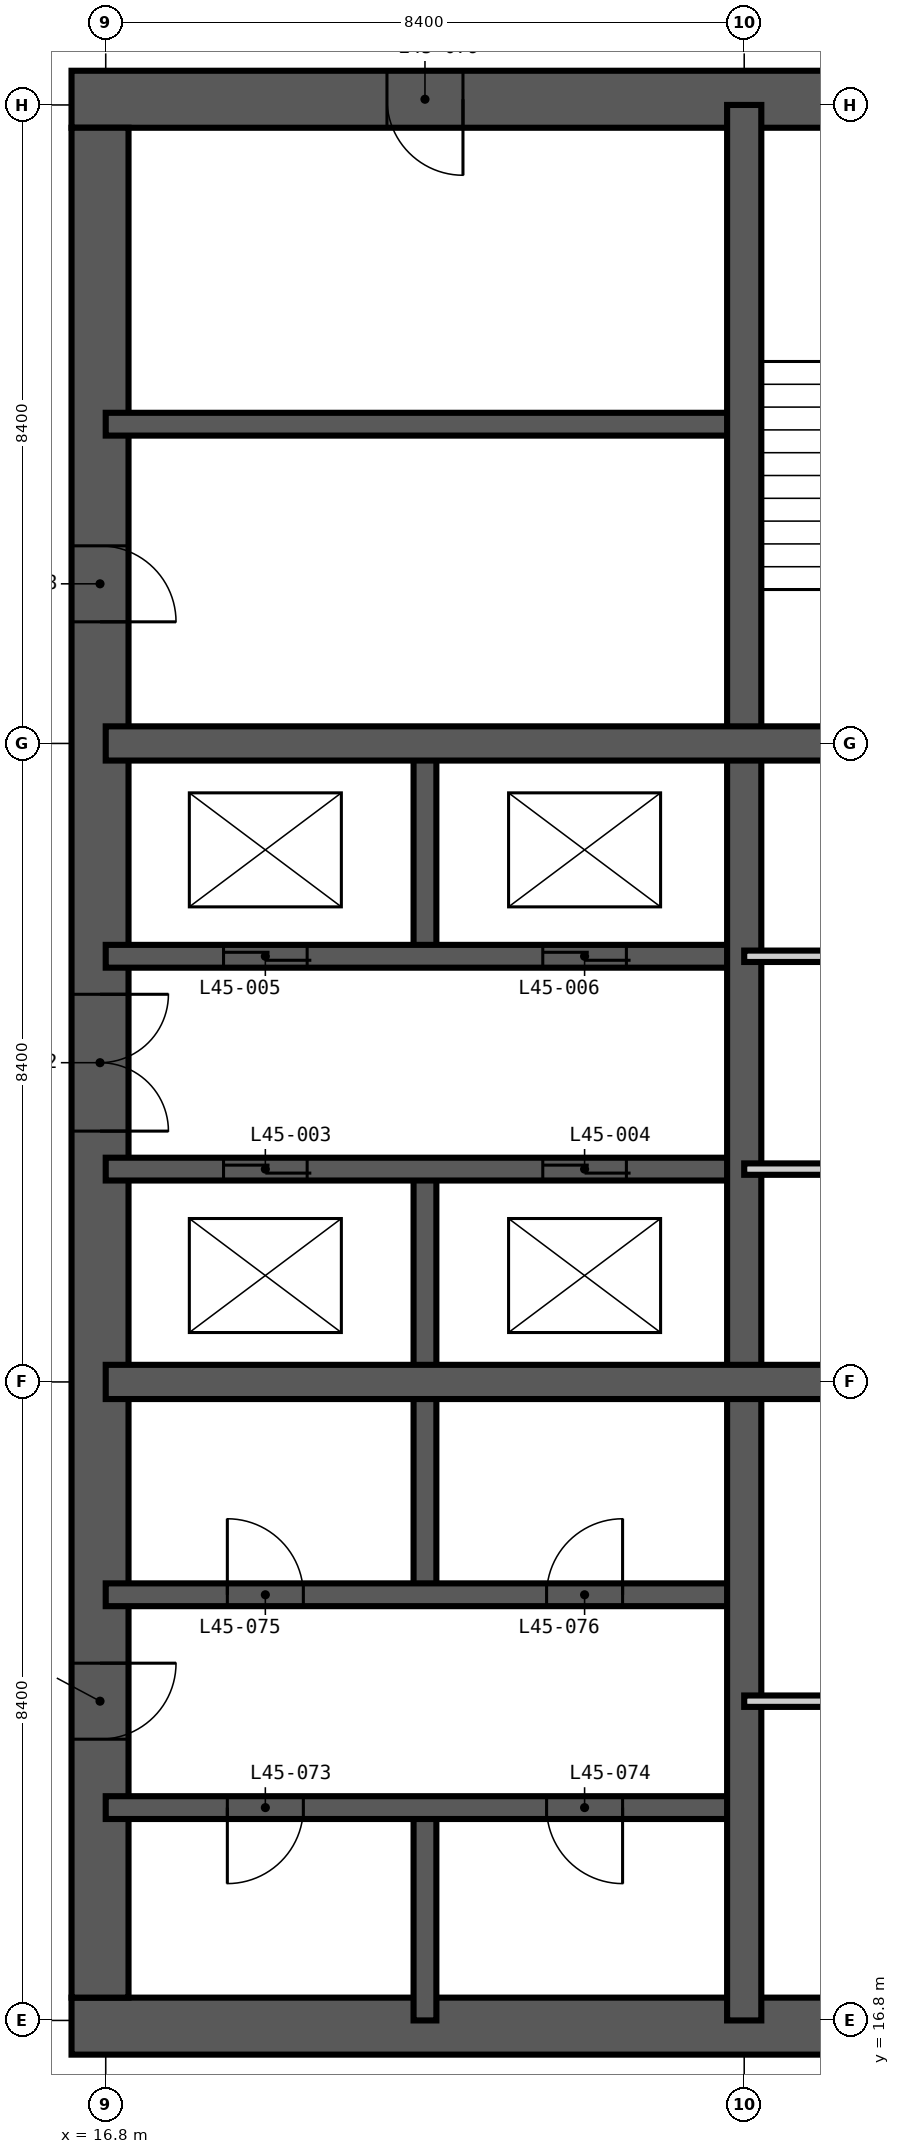
"""IFC4 building model, lengths in metres.
Left out: names, types, materials, properties, quantities, classifications, styles, units other than length and angle.
Written with IfcOpenShell. Run it as: python <this file> out.ifc"""

import sys

from ifc_helpers import new_model, si_unit, direction, frame, frame_2d, origin, place, context, subcontext, project, spatial, rectangle, extrude, element, fill, save


model = new_model("IFC4")
c1 = context("Model", 3, precision=1e-05, world=origin(), true_north=direction((0.0, 1.0)))
c2 = subcontext(c1, "Body", "Model", "MODEL_VIEW")
j1 = project(units=[si_unit("LENGTHUNIT", "METRE"), si_unit("PLANEANGLEUNIT", "RADIAN")], contexts=[c1])
p1 = place(None, origin())
s1 = spatial("IfcSite", under=j1, at=p1, CompositionType="ELEMENT")
p2 = place(p1, origin())
s2 = spatial("IfcBuilding", under=s1, at=p2, CompositionType="ELEMENT")
p3 = place(p2, frame((0.0, 0.0, 177.0)))
s3 = spatial("IfcBuildingStorey", under=s2, at=p3, CompositionType="ELEMENT", Elevation=177.0)
p4 = place(p3, frame((16.35, 16.725, -0.35), z_axis=(0.0, 0.0, 1.0), x_axis=(1.0, 0.0, 0.0)))
e1 = element("IfcWall", 1, at=p4, inside=s3, PredefinedType="SHEAR", context=c2, shape_type="SweptSolid", body=[
    extrude(rectangle(XDim=26.1, YDim=0.75, at=frame_2d((13.05, 0.0))), origin(), (0.0, 0.0, 1.0), 3.6),
])
p5 = place(p4, frame((12.55, 0.0, 0.35)))
e2 = element("IfcOpeningElement", 2, at=p5, cuts=e1, PredefinedType="OPENING", context=c2, shape_type="SweptSolid", body=[
    extrude(rectangle(XDim=1.0, YDim=2.1, at=frame_2d((0.5, 1.05))), frame((0.0, 0.385, 0.0), z_axis=(0.0, -1.0, 0.0), x_axis=(1.0, 0.0, 0.0)), (0.0, 0.0, 1.0), 0.77),
])
p6 = place(p4, frame((18.85, 0.0, 0.35)))
e3 = element("IfcOpeningElement", 3, at=p6, cuts=e1, PredefinedType="OPENING", context=c2, shape_type="SweptSolid", body=[
    extrude(rectangle(XDim=1.0, YDim=2.1, at=frame_2d((0.5, 1.05))), frame((0.0, 0.385, 0.0), z_axis=(0.0, -1.0, 0.0), x_axis=(1.0, 0.0, 0.0)), (0.0, 0.0, 1.0), 0.77),
])
p7 = place(p3, frame((42.45, 42.075, -0.35), z_axis=(0.0, 0.0, 1.0), x_axis=(-1.0, 0.0, 0.0)))
e4 = element("IfcWall", 4, at=p7, inside=s3, PredefinedType="SHEAR", context=c2, shape_type="SweptSolid", body=[
    extrude(rectangle(XDim=26.1, YDim=0.75, at=frame_2d((13.05, 0.0))), origin(), (0.0, 0.0, 1.0), 3.6),
])
p8 = place(p7, frame((20.95, 0.0, 0.35)))
e5 = element("IfcOpeningElement", 5, at=p8, cuts=e4, PredefinedType="OPENING", context=c2, shape_type="SweptSolid", body=[
    extrude(rectangle(XDim=1.0, YDim=2.1, at=frame_2d((0.5, 1.05))), frame((0.0, 0.385, 0.0), z_axis=(0.0, -1.0, 0.0), x_axis=(1.0, 0.0, 0.0)), (0.0, 0.0, 1.0), 0.77),
])
p9 = place(p7, frame((10.35, 0.0, 0.35)))
e6 = element("IfcOpeningElement", 6, at=p9, cuts=e4, PredefinedType="OPENING", context=c2, shape_type="SweptSolid", body=[
    extrude(rectangle(XDim=1.2, YDim=2.2, at=frame_2d((0.6, 1.1))), frame((0.0, 0.385, 0.0), z_axis=(0.0, -1.0, 0.0), x_axis=(1.0, 0.0, 0.0)), (0.0, 0.0, 1.0), 0.77),
])
p10 = place(p3, frame((16.725, 41.7, -0.35), z_axis=(0.0, 0.0, 1.0), x_axis=(0.0, -1.0, 0.0)))
e7 = element("IfcWall", 7, at=p10, inside=s3, PredefinedType="SHEAR", context=c2, shape_type="SweptSolid", body=[
    extrude(rectangle(XDim=24.6, YDim=0.75, at=frame_2d((12.3, 0.0))), origin(), (0.0, 0.0, 1.0), 3.6),
])
p11 = place(p10, frame((11.4, 0.0, 0.35)))
e8 = element("IfcOpeningElement", 8, at=p11, cuts=e7, PredefinedType="OPENING", context=c2, shape_type="SweptSolid", body=[
    extrude(rectangle(XDim=1.8, YDim=2.2, at=frame_2d((0.9, 1.1))), frame((0.0, 0.385, 0.0), z_axis=(0.0, -1.0, 0.0), x_axis=(1.0, 0.0, 0.0)), (0.0, 0.0, 1.0), 0.77),
])
p12 = place(p10, frame((20.2, 0.0, 0.35)))
e9 = element("IfcOpeningElement", 9, at=p12, cuts=e7, PredefinedType="OPENING", context=c2, shape_type="SweptSolid", body=[
    extrude(rectangle(XDim=1.0, YDim=2.1, at=frame_2d((0.5, 1.05))), frame((0.0, 0.385, 0.0), z_axis=(0.0, -1.0, 0.0), x_axis=(1.0, 0.0, 0.0)), (0.0, 0.0, 1.0), 0.77),
])
p13 = place(p10, frame((5.5, 0.0, 0.35)))
e10 = element("IfcOpeningElement", 10, at=p13, cuts=e7, PredefinedType="OPENING", context=c2, shape_type="SweptSolid", body=[
    extrude(rectangle(XDim=1.0, YDim=2.1, at=frame_2d((0.5, 1.05))), frame((0.0, 0.385, 0.0), z_axis=(0.0, -1.0, 0.0), x_axis=(1.0, 0.0, 0.0)), (0.0, 0.0, 1.0), 0.77),
])
p14 = place(p3, frame((21.0, 16.8, -0.35), z_axis=(0.0, 0.0, 1.0), x_axis=(0.0, 1.0, 0.0)))
e11 = element("IfcWall", 11, at=p14, inside=s3, PredefinedType="SHEAR", context=c2, shape_type="SweptSolid", body=[
    extrude(rectangle(XDim=2.8, YDim=0.3, at=frame_2d((1.4, 0.0))), origin(), (0.0, 0.0, 1.0), 3.6),
])
p15 = place(p3, frame((21.0, 22.4, -0.35), z_axis=(0.0, 0.0, 1.0), x_axis=(0.0, 1.0, 0.0)))
e12 = element("IfcWall", 12, at=p15, inside=s3, PredefinedType="SHEAR", context=c2, shape_type="SweptSolid", body=[
    extrude(rectangle(XDim=5.6, YDim=0.3, at=frame_2d((2.8, 0.0))), origin(), (0.0, 0.0, 1.0), 3.6),
])
p16 = place(p3, frame((21.0, 30.8, -0.35), z_axis=(0.0, 0.0, 1.0), x_axis=(0.0, 1.0, 0.0)))
e13 = element("IfcWall", 13, at=p16, inside=s3, PredefinedType="SHEAR", context=c2, shape_type="SweptSolid", body=[
    extrude(rectangle(XDim=2.8, YDim=0.3, at=frame_2d((1.4, 0.0))), origin(), (0.0, 0.0, 1.0), 3.6),
])
p17 = place(p3, frame((16.8, 19.6, -0.35), z_axis=(0.0, 0.0, 1.0), x_axis=(1.0, 0.0, 0.0)))
e14 = element("IfcWall", 14, at=p17, inside=s3, PredefinedType="SHEAR", context=c2, shape_type="SweptSolid", body=[
    extrude(rectangle(XDim=8.4, YDim=0.3, at=frame_2d((4.2, 0.0))), origin(), (0.0, 0.0, 1.0), 3.6),
])
p18 = place(p17, frame((1.6, 0.0, 0.35)))
e15 = element("IfcOpeningElement", 15, at=p18, cuts=e14, PredefinedType="OPENING", context=c2, shape_type="SweptSolid", body=[
    extrude(rectangle(XDim=1.0, YDim=2.1, at=frame_2d((0.5, 1.05))), frame((0.0, 0.16, 0.0), z_axis=(0.0, -1.0, 0.0), x_axis=(1.0, 0.0, 0.0)), (0.0, 0.0, 1.0), 0.32),
])
p19 = place(p17, frame((5.8, 0.0, 0.35)))
e16 = element("IfcOpeningElement", 16, at=p19, cuts=e14, PredefinedType="OPENING", context=c2, shape_type="SweptSolid", body=[
    extrude(rectangle(XDim=1.0, YDim=2.1, at=frame_2d((0.5, 1.05))), frame((0.0, 0.16, 0.0), z_axis=(0.0, -1.0, 0.0), x_axis=(1.0, 0.0, 0.0)), (0.0, 0.0, 1.0), 0.32),
])
p20 = place(p3, frame((16.8, 22.4, -0.35), z_axis=(0.0, 0.0, 1.0), x_axis=(1.0, 0.0, 0.0)))
e17 = element("IfcWall", 17, at=p20, inside=s3, PredefinedType="SHEAR", context=c2, shape_type="SweptSolid", body=[
    extrude(rectangle(XDim=8.4, YDim=0.3, at=frame_2d((4.2, 0.0))), origin(), (0.0, 0.0, 1.0), 3.6),
])
p21 = place(p20, frame((1.6, 0.0, 0.35)))
e18 = element("IfcOpeningElement", 18, at=p21, cuts=e17, PredefinedType="OPENING", context=c2, shape_type="SweptSolid", body=[
    extrude(rectangle(XDim=1.0, YDim=2.1, at=frame_2d((0.5, 1.05))), frame((0.0, 0.16, 0.0), z_axis=(0.0, -1.0, 0.0), x_axis=(1.0, 0.0, 0.0)), (0.0, 0.0, 1.0), 0.32),
])
p22 = place(p20, frame((5.8, 0.0, 0.35)))
e19 = element("IfcOpeningElement", 19, at=p22, cuts=e17, PredefinedType="OPENING", context=c2, shape_type="SweptSolid", body=[
    extrude(rectangle(XDim=1.0, YDim=2.1, at=frame_2d((0.5, 1.05))), frame((0.0, 0.16, 0.0), z_axis=(0.0, -1.0, 0.0), x_axis=(1.0, 0.0, 0.0)), (0.0, 0.0, 1.0), 0.32),
])
p23 = place(p3, frame((16.8, 28.0, -0.35), z_axis=(0.0, 0.0, 1.0), x_axis=(1.0, 0.0, 0.0)))
e20 = element("IfcWall", 20, at=p23, inside=s3, PredefinedType="SHEAR", context=c2, shape_type="SweptSolid", body=[
    extrude(rectangle(XDim=8.4, YDim=0.3, at=frame_2d((4.2, 0.0))), origin(), (0.0, 0.0, 1.0), 3.6),
])
p24 = place(p23, frame((1.55, 0.0, 0.35)))
e21 = element("IfcOpeningElement", 21, at=p24, cuts=e20, PredefinedType="OPENING", context=c2, shape_type="SweptSolid", body=[
    extrude(rectangle(XDim=1.1, YDim=2.2, at=frame_2d((0.55, 1.1))), frame((0.0, 0.16, 0.0), z_axis=(0.0, -1.0, 0.0), x_axis=(1.0, 0.0, 0.0)), (0.0, 0.0, 1.0), 0.32),
])
p25 = place(p23, frame((5.75, 0.0, 0.35)))
e22 = element("IfcOpeningElement", 22, at=p25, cuts=e20, PredefinedType="OPENING", context=c2, shape_type="SweptSolid", body=[
    extrude(rectangle(XDim=1.1, YDim=2.2, at=frame_2d((0.55, 1.1))), frame((0.0, 0.16, 0.0), z_axis=(0.0, -1.0, 0.0), x_axis=(1.0, 0.0, 0.0)), (0.0, 0.0, 1.0), 0.32),
])
p26 = place(p3, frame((16.8, 30.8, -0.35), z_axis=(0.0, 0.0, 1.0), x_axis=(1.0, 0.0, 0.0)))
e23 = element("IfcWall", 23, at=p26, inside=s3, PredefinedType="SHEAR", context=c2, shape_type="SweptSolid", body=[
    extrude(rectangle(XDim=8.4, YDim=0.3, at=frame_2d((4.2, 0.0))), origin(), (0.0, 0.0, 1.0), 3.6),
])
p27 = place(p26, frame((1.55, 0.0, 0.35)))
e24 = element("IfcOpeningElement", 24, at=p27, cuts=e23, PredefinedType="OPENING", context=c2, shape_type="SweptSolid", body=[
    extrude(rectangle(XDim=1.1, YDim=2.2, at=frame_2d((0.55, 1.1))), frame((0.0, 0.16, 0.0), z_axis=(0.0, -1.0, 0.0), x_axis=(1.0, 0.0, 0.0)), (0.0, 0.0, 1.0), 0.32),
])
p28 = place(p26, frame((5.75, 0.0, 0.35)))
e25 = element("IfcOpeningElement", 25, at=p28, cuts=e23, PredefinedType="OPENING", context=c2, shape_type="SweptSolid", body=[
    extrude(rectangle(XDim=1.1, YDim=2.2, at=frame_2d((0.55, 1.1))), frame((0.0, 0.16, 0.0), z_axis=(0.0, -1.0, 0.0), x_axis=(1.0, 0.0, 0.0)), (0.0, 0.0, 1.0), 0.32),
])
p29 = place(p3, frame((16.8, 37.8, -0.35), z_axis=(0.0, 0.0, 1.0), x_axis=(1.0, 0.0, 0.0)))
e26 = element("IfcWall", 26, at=p29, inside=s3, PredefinedType="SHEAR", context=c2, shape_type="SweptSolid", body=[
    extrude(rectangle(XDim=8.4, YDim=0.3, at=frame_2d((4.2, 0.0))), origin(), (0.0, 0.0, 1.0), 3.6),
])
for number, where, z_axis, x_axis in (
    (27, (25.2, 16.8, -0.35), (0.0, 0.0, 1.0), (0.0, 1.0, 0.0)),
    (28, (16.8, 25.2, -0.35), (0.0, 0.0, 1.0), (1.0, 0.0, 0.0)),
    (29, (16.8, 33.6, -0.35), (0.0, 0.0, 1.0), (1.0, 0.0, 0.0)),
):
    element("IfcWall", number, at=place(p3, frame(where, z_axis=z_axis, x_axis=x_axis)), inside=s3, PredefinedType="SHEAR", context=c2, shape_type="SweptSolid", body=[
        extrude(rectangle(XDim=25.2, YDim=0.45, at=frame_2d((12.6, 0.0))), origin(), (0.0, 0.0, 1.0), 3.6),
    ])
p30 = place(p3, frame((25.2, 21.0, 0.0), z_axis=(0.0, 0.0, 1.0), x_axis=(1.0, 0.0, 0.0)))
e30 = element("IfcWall", 30, at=p30, inside=s3, PredefinedType="PARTITIONING", context=c2, shape_type="SweptSolid", body=[
    extrude(rectangle(XDim=8.4, YDim=0.15, at=frame_2d((4.2, 0.0))), origin(), (0.0, 0.0, 1.0), 3.25),
])
p31 = place(p30, frame((3.7, 0.0, 0.0)))
e31 = element("IfcOpeningElement", 31, at=p31, cuts=e30, PredefinedType="OPENING", context=c2, shape_type="SweptSolid", body=[
    extrude(rectangle(XDim=1.0, YDim=2.1, at=frame_2d((0.5, 1.05))), frame((0.0, 0.085, 0.0), z_axis=(0.0, -1.0, 0.0), x_axis=(1.0, 0.0, 0.0)), (0.0, 0.0, 1.0), 0.17),
])
p32 = place(p3, frame((25.2, 28.0, 0.0), z_axis=(0.0, 0.0, 1.0), x_axis=(1.0, 0.0, 0.0)))
e32 = element("IfcWall", 32, at=p32, inside=s3, PredefinedType="PARTITIONING", context=c2, shape_type="SweptSolid", body=[
    extrude(rectangle(XDim=8.4, YDim=0.15, at=frame_2d((4.2, 0.0))), origin(), (0.0, 0.0, 1.0), 3.25),
])
p33 = place(p32, frame((5.8, 0.0, 0.0)))
e33 = element("IfcOpeningElement", 33, at=p33, cuts=e32, PredefinedType="OPENING", context=c2, shape_type="SweptSolid", body=[
    extrude(rectangle(XDim=1.0, YDim=2.1, at=frame_2d((0.5, 1.05))), frame((0.0, 0.085, 0.0), z_axis=(0.0, -1.0, 0.0), x_axis=(1.0, 0.0, 0.0)), (0.0, 0.0, 1.0), 0.17),
])
p34 = place(p32, frame((1.6, 0.0, 0.0)))
e34 = element("IfcOpeningElement", 34, at=p34, cuts=e32, PredefinedType="OPENING", context=c2, shape_type="SweptSolid", body=[
    extrude(rectangle(XDim=1.0, YDim=2.1, at=frame_2d((0.5, 1.05))), frame((0.0, 0.085, 0.0), z_axis=(0.0, -1.0, 0.0), x_axis=(1.0, 0.0, 0.0)), (0.0, 0.0, 1.0), 0.17),
])
p35 = place(p3, frame((25.2, 30.8, 0.0), z_axis=(0.0, 0.0, 1.0), x_axis=(1.0, 0.0, 0.0)))
e35 = element("IfcWall", 35, at=p35, inside=s3, PredefinedType="PARTITIONING", context=c2, shape_type="SweptSolid", body=[
    extrude(rectangle(XDim=8.4, YDim=0.15, at=frame_2d((4.2, 0.0))), origin(), (0.0, 0.0, 1.0), 3.25),
])
p36 = place(p35, frame((3.7, 0.0, 0.0)))
e36 = element("IfcOpeningElement", 36, at=p36, cuts=e35, PredefinedType="OPENING", context=c2, shape_type="SweptSolid", body=[
    extrude(rectangle(XDim=1.0, YDim=2.1, at=frame_2d((0.5, 1.05))), frame((0.0, 0.085, 0.0), z_axis=(0.0, -1.0, 0.0), x_axis=(1.0, 0.0, 0.0)), (0.0, 0.0, 1.0), 0.17),
])
p37 = place(p24, origin())
e37 = element("IfcDoor", 37, at=p37, inside=s3, OperationType="DOUBLE_DOOR_SLIDING", PredefinedType="DOOR", context=c2, shape_type="SweptSolid", body=[
    extrude(rectangle(XDim=1.1, YDim=2.2, at=frame_2d((0.55, 1.1))), frame((0.0, 0.025, 0.0), z_axis=(0.0, -1.0, 0.0), x_axis=(1.0, 0.0, 0.0)), (0.0, 0.0, 1.0), 0.05),
])
fill(e21, e37)
p38 = place(p25, origin())
e38 = element("IfcDoor", 38, at=p38, inside=s3, OperationType="DOUBLE_DOOR_SLIDING", PredefinedType="DOOR", context=c2, shape_type="SweptSolid", body=[
    extrude(rectangle(XDim=1.1, YDim=2.2, at=frame_2d((0.55, 1.1))), frame((0.0, 0.025, 0.0), z_axis=(0.0, -1.0, 0.0), x_axis=(1.0, 0.0, 0.0)), (0.0, 0.0, 1.0), 0.05),
])
fill(e22, e38)
p39 = place(p27, origin())
e39 = element("IfcDoor", 39, at=p39, inside=s3, OperationType="DOUBLE_DOOR_SLIDING", PredefinedType="DOOR", context=c2, shape_type="SweptSolid", body=[
    extrude(rectangle(XDim=1.1, YDim=2.2, at=frame_2d((0.55, 1.1))), frame((0.0, 0.025, 0.0), z_axis=(0.0, -1.0, 0.0), x_axis=(1.0, 0.0, 0.0)), (0.0, 0.0, 1.0), 0.05),
])
fill(e24, e39)
p40 = place(p28, origin())
e40 = element("IfcDoor", 40, at=p40, inside=s3, OperationType="DOUBLE_DOOR_SLIDING", PredefinedType="DOOR", context=c2, shape_type="SweptSolid", body=[
    extrude(rectangle(XDim=1.1, YDim=2.2, at=frame_2d((0.55, 1.1))), frame((0.0, 0.025, 0.0), z_axis=(0.0, -1.0, 0.0), x_axis=(1.0, 0.0, 0.0)), (0.0, 0.0, 1.0), 0.05),
])
fill(e25, e40)
p41 = place(p11, origin())
e41 = element("IfcDoor", 41, at=p41, inside=s3, OperationType="DOUBLE_DOOR_DOUBLE_SWING", PredefinedType="DOOR", context=c2, shape_type="SweptSolid", body=[
    extrude(rectangle(XDim=1.8, YDim=2.2, at=frame_2d((0.9, 1.1))), frame((0.0, 0.025, 0.0), z_axis=(0.0, -1.0, 0.0), x_axis=(1.0, 0.0, 0.0)), (0.0, 0.0, 1.0), 0.05),
])
fill(e8, e41)
p42 = place(p18, frame((1.0, 0.0, 0.0), z_axis=(0.0, 0.0, 1.0), x_axis=(-1.0, 0.0, 0.0)))
e42 = element("IfcDoor", 42, at=p42, inside=s3, OperationType="SINGLE_SWING_RIGHT", PredefinedType="DOOR", context=c2, shape_type="SweptSolid", body=[
    extrude(rectangle(XDim=1.0, YDim=2.1, at=frame_2d((0.5, 1.05))), frame((0.0, 0.025, 0.0), z_axis=(0.0, -1.0, 0.0), x_axis=(1.0, 0.0, 0.0)), (0.0, 0.0, 1.0), 0.05),
])
fill(e15, e42)
p43 = place(p19, frame((1.0, 0.0, 0.0), z_axis=(0.0, 0.0, 1.0), x_axis=(-1.0, 0.0, 0.0)))
e43 = element("IfcDoor", 43, at=p43, inside=s3, OperationType="SINGLE_SWING_LEFT", PredefinedType="DOOR", context=c2, shape_type="SweptSolid", body=[
    extrude(rectangle(XDim=1.0, YDim=2.1, at=frame_2d((0.5, 1.05))), frame((0.0, 0.025, 0.0), z_axis=(0.0, -1.0, 0.0), x_axis=(1.0, 0.0, 0.0)), (0.0, 0.0, 1.0), 0.05),
])
fill(e16, e43)
p44 = place(p21, origin())
e44 = element("IfcDoor", 44, at=p44, inside=s3, OperationType="SINGLE_SWING_LEFT", PredefinedType="DOOR", context=c2, shape_type="SweptSolid", body=[
    extrude(rectangle(XDim=1.0, YDim=2.1, at=frame_2d((0.5, 1.05))), frame((0.0, 0.025, 0.0), z_axis=(0.0, -1.0, 0.0), x_axis=(1.0, 0.0, 0.0)), (0.0, 0.0, 1.0), 0.05),
])
fill(e18, e44)
p45 = place(p22, origin())
e45 = element("IfcDoor", 45, at=p45, inside=s3, OperationType="SINGLE_SWING_RIGHT", PredefinedType="DOOR", context=c2, shape_type="SweptSolid", body=[
    extrude(rectangle(XDim=1.0, YDim=2.1, at=frame_2d((0.5, 1.05))), frame((0.0, 0.025, 0.0), z_axis=(0.0, -1.0, 0.0), x_axis=(1.0, 0.0, 0.0)), (0.0, 0.0, 1.0), 0.05),
])
fill(e19, e45)
p46 = place(p12, origin())
e46 = element("IfcDoor", 46, at=p46, inside=s3, OperationType="SINGLE_SWING_LEFT", PredefinedType="DOOR", context=c2, shape_type="SweptSolid", body=[
    extrude(rectangle(XDim=1.0, YDim=2.1, at=frame_2d((0.5, 1.05))), frame((0.0, 0.025, 0.0), z_axis=(0.0, -1.0, 0.0), x_axis=(1.0, 0.0, 0.0)), (0.0, 0.0, 1.0), 0.05),
])
fill(e9, e46)
p47 = place(p13, origin())
e47 = element("IfcDoor", 47, at=p47, inside=s3, OperationType="SINGLE_SWING_RIGHT", PredefinedType="DOOR", context=c2, shape_type="SweptSolid", body=[
    extrude(rectangle(XDim=1.0, YDim=2.1, at=frame_2d((0.5, 1.05))), frame((0.0, 0.025, 0.0), z_axis=(0.0, -1.0, 0.0), x_axis=(1.0, 0.0, 0.0)), (0.0, 0.0, 1.0), 0.05),
])
fill(e10, e47)
p48 = place(p8, origin())
e48 = element("IfcDoor", 48, at=p48, inside=s3, OperationType="SINGLE_SWING_LEFT", PredefinedType="DOOR", context=c2, shape_type="SweptSolid", body=[
    extrude(rectangle(XDim=1.0, YDim=2.1, at=frame_2d((0.5, 1.05))), frame((0.0, 0.025, 0.0), z_axis=(0.0, -1.0, 0.0), x_axis=(1.0, 0.0, 0.0)), (0.0, 0.0, 1.0), 0.05),
])
fill(e5, e48)
save(model, sys.argv[1])
